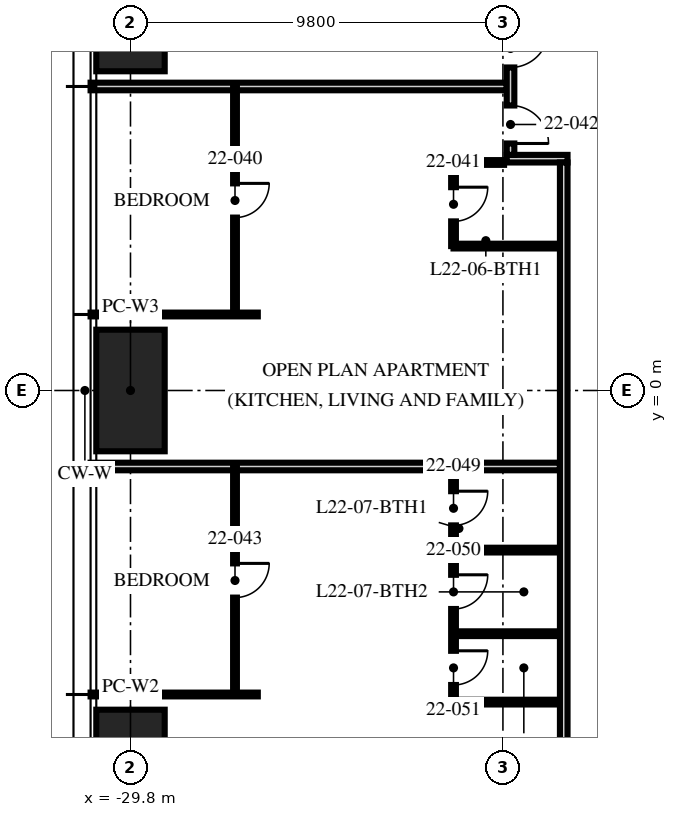
"""IFC4 building model, lengths in metres.
Left out: names, types, materials, properties, quantities, classifications, styles, units other than length and angle.
Written with IfcOpenShell. Run it as: python <this file> out.ifc"""

import sys

from ifc_helpers import new_model, si_unit, direction, frame, frame_2d, origin, origin_2d, place, context, subcontext, project, spatial, rectangle, hollow_rectangle, extrude, element, fill, save


model = new_model("IFC4")
c1 = context("Model", 3, precision=1e-05, world=origin(), true_north=direction((0.0, 1.0)))
c2 = subcontext(c1, "Body", "Model", "MODEL_VIEW")
j1 = project(units=[si_unit("LENGTHUNIT", "METRE"), si_unit("PLANEANGLEUNIT", "RADIAN")], contexts=[c1])
p1 = place(None, origin())
s1 = spatial("IfcSite", under=j1, at=p1, CompositionType="ELEMENT")
p2 = place(p1, origin())
s2 = spatial("IfcBuilding", under=s1, at=p2, CompositionType="ELEMENT")
p3 = place(p2, frame((0.0, 0.0, 88.5)))
s3 = spatial("IfcBuildingStorey", under=s2, at=p3, CompositionType="ELEMENT", Elevation=88.5)
for number, where, z_axis, x_axis in (
    (1, (-29.8, -10.0, 0.0), (0.0, 0.0, 1.0), (0.0, 1.0, 0.0)),
    (2, (-29.8, 0.0, 0.0), (0.0, 0.0, 1.0), (0.0, 1.0, 0.0)),
    (3, (-29.8, 10.0, 0.0), (0.0, 0.0, 1.0), (0.0, 1.0, 0.0)),
):
    element("IfcColumn", number, at=place(p3, frame(where, z_axis=z_axis, x_axis=x_axis)), inside=s3, PredefinedType="COLUMN", context=c2, shape_type="SweptSolid", body=[
        extrude(hollow_rectangle(XDim=3.2, YDim=1.8, WallThickness=0.2, at=origin_2d()), origin(), (0.0, 0.0, 1.0), 3.75),
    ])
p4 = place(p3, frame((-19.9, 8.0, 0.0), z_axis=(0.0, 0.0, 1.0), x_axis=(-1.0, 0.0, 0.0)))
e4 = element("IfcWall", 4, at=p4, inside=s3, PredefinedType="PARTITIONING", context=c2, shape_type="SweptSolid", body=[
    extrude(rectangle(XDim=10.95, YDim=0.2, at=frame_2d((5.475, 0.0))), origin(), (0.0, 0.0, 1.0), 2.71),
])
p5 = place(p3, frame((-26.45, 2.0, 0.0), z_axis=(0.0, 0.0, 1.0), x_axis=(-1.0, 0.0, 0.0)))
e5 = element("IfcWall", 5, at=p5, inside=s3, PredefinedType="PARTITIONING", context=c2, shape_type="SweptSolid", body=[
    extrude(rectangle(XDim=4.4, YDim=0.1, at=frame_2d((2.2, 0.0))), origin(), (0.0, 0.0, 1.0), 2.71),
])
p6 = place(p3, frame((-18.5, -2.0, 0.0), z_axis=(0.0, 0.0, 1.0), x_axis=(-1.0, 0.0, 0.0)))
e6 = element("IfcWall", 6, at=p6, inside=s3, PredefinedType="PARTITIONING", context=c2, shape_type="SweptSolid", body=[
    extrude(rectangle(XDim=12.35, YDim=0.2, at=frame_2d((6.175, 0.0))), origin(), (0.0, 0.0, 1.0), 2.71),
])
p7 = place(p3, frame((-26.45, -8.0, 0.0), z_axis=(0.0, 0.0, 1.0), x_axis=(-1.0, 0.0, 0.0)))
e7 = element("IfcWall", 7, at=p7, inside=s3, PredefinedType="PARTITIONING", context=c2, shape_type="SweptSolid", body=[
    extrude(rectangle(XDim=4.4, YDim=0.1, at=frame_2d((2.2, 0.0))), origin(), (0.0, 0.0, 1.0), 2.71),
])
p8 = place(p3, frame((-27.05, 8.0, 0.0), z_axis=(0.0, 0.0, 1.0), x_axis=(0.0, -1.0, 0.0)))
e8 = element("IfcWall", 8, at=p8, inside=s3, PredefinedType="PARTITIONING", context=c2, shape_type="SweptSolid", body=[
    extrude(rectangle(XDim=6.0, YDim=0.1, at=frame_2d((3.0, 0.0))), origin(), (0.0, 0.0, 1.0), 2.61),
])
p9 = place(p8, frame((2.55, 0.0, 0.0)))
e9 = element("IfcOpeningElement", 9, at=p9, cuts=e8, PredefinedType="OPENING", context=c2, shape_type="SweptSolid", body=[
    extrude(rectangle(XDim=0.9, YDim=2.1, at=frame_2d((0.45, 1.05))), frame((0.0, 0.06, 0.0), z_axis=(0.0, -1.0, 0.0), x_axis=(1.0, 0.0, 0.0)), (0.0, 0.0, 1.0), 0.12),
])
p10 = place(p3, frame((-21.3, 6.0, 0.0), z_axis=(0.0, 0.0, 1.0), x_axis=(0.0, -1.0, 0.0)))
e10 = element("IfcWall", 10, at=p10, inside=s3, PredefinedType="PARTITIONING", context=c2, shape_type="SweptSolid", body=[
    extrude(rectangle(XDim=2.2, YDim=0.125, at=frame_2d((1.1, 0.0))), origin(), (0.0, 0.0, 1.0), 2.61),
])
p11 = place(p10, frame((0.65, 0.0, 0.0)))
e11 = element("IfcOpeningElement", 11, at=p11, cuts=e10, PredefinedType="OPENING", context=c2, shape_type="SweptSolid", body=[
    extrude(rectangle(XDim=0.9, YDim=2.1, at=frame_2d((0.45, 1.05))), frame((0.0, 0.073, 0.0), z_axis=(0.0, -1.0, 0.0), x_axis=(1.0, 0.0, 0.0)), (0.0, 0.0, 1.0), 0.145),
])
p12 = place(p3, frame((-19.97, 6.0, 0.0), z_axis=(0.0, 0.0, 1.0), x_axis=(-1.0, 0.0, 0.0)))
e12 = element("IfcWall", 12, at=p12, inside=s3, PredefinedType="PARTITIONING", context=c2, shape_type="SweptSolid", body=[
    extrude(rectangle(XDim=1.33, YDim=0.125, at=frame_2d((0.665, 0.0))), origin(), (0.0, 0.0, 1.0), 3.5),
])
p13 = place(p3, frame((-18.5, 3.8, 0.0), z_axis=(0.0, 0.0, 1.0), x_axis=(-1.0, 0.0, 0.0)))
e13 = element("IfcWall", 13, at=p13, inside=s3, PredefinedType="PARTITIONING", context=c2, shape_type="SweptSolid", body=[
    extrude(rectangle(XDim=2.8, YDim=0.125, at=frame_2d((1.4, 0.0))), origin(), (0.0, 0.0, 1.0), 3.5),
])
p14 = place(p3, frame((-27.05, -2.0, 0.0), z_axis=(0.0, 0.0, 1.0), x_axis=(0.0, -1.0, 0.0)))
e14 = element("IfcWall", 14, at=p14, inside=s3, PredefinedType="PARTITIONING", context=c2, shape_type="SweptSolid", body=[
    extrude(rectangle(XDim=6.0, YDim=0.1, at=frame_2d((3.0, 0.0))), origin(), (0.0, 0.0, 1.0), 2.61),
])
p15 = place(p14, frame((2.55, 0.0, 0.0)))
e15 = element("IfcOpeningElement", 15, at=p15, cuts=e14, PredefinedType="OPENING", context=c2, shape_type="SweptSolid", body=[
    extrude(rectangle(XDim=0.9, YDim=2.1, at=frame_2d((0.45, 1.05))), frame((0.0, 0.06, 0.0), z_axis=(0.0, -1.0, 0.0), x_axis=(1.0, 0.0, 0.0)), (0.0, 0.0, 1.0), 0.12),
])
p16 = place(p3, frame((-21.3, -2.0, 0.0), z_axis=(0.0, 0.0, 1.0), x_axis=(0.0, -1.0, 0.0)))
e16 = element("IfcWall", 16, at=p16, inside=s3, PredefinedType="PARTITIONING", context=c2, shape_type="SweptSolid", body=[
    extrude(rectangle(XDim=6.2, YDim=0.125, at=frame_2d((3.1, 0.0))), origin(), (0.0, 0.0, 1.0), 2.61),
])
p17 = place(p16, frame((0.65, 0.0, 0.0)))
e17 = element("IfcOpeningElement", 17, at=p17, cuts=e16, PredefinedType="OPENING", context=c2, shape_type="SweptSolid", body=[
    extrude(rectangle(XDim=0.9, YDim=2.1, at=frame_2d((0.45, 1.05))), frame((0.0, 0.073, 0.0), z_axis=(0.0, -1.0, 0.0), x_axis=(1.0, 0.0, 0.0)), (0.0, 0.0, 1.0), 0.145),
])
p18 = place(p16, frame((2.85, 0.0, 0.0)))
e18 = element("IfcOpeningElement", 18, at=p18, cuts=e16, PredefinedType="OPENING", context=c2, shape_type="SweptSolid", body=[
    extrude(rectangle(XDim=0.9, YDim=2.1, at=frame_2d((0.45, 1.05))), frame((0.0, 0.073, 0.0), z_axis=(0.0, -1.0, 0.0), x_axis=(1.0, 0.0, 0.0)), (0.0, 0.0, 1.0), 0.145),
])
p19 = place(p16, frame((4.85, 0.0, 0.0)))
e19 = element("IfcOpeningElement", 19, at=p19, cuts=e16, PredefinedType="OPENING", context=c2, shape_type="SweptSolid", body=[
    extrude(rectangle(XDim=0.9, YDim=2.1, at=frame_2d((0.45, 1.05))), frame((0.0, 0.073, 0.0), z_axis=(0.0, -1.0, 0.0), x_axis=(1.0, 0.0, 0.0)), (0.0, 0.0, 1.0), 0.145),
])
for number, where, z_axis, x_axis in (
    (20, (-18.5, -4.2, 0.0), (0.0, 0.0, 1.0), (-1.0, 0.0, 0.0)),
    (21, (-18.5, -6.4, 0.0), (0.0, 0.0, 1.0), (-1.0, 0.0, 0.0)),
    (22, (-18.5, -8.2, 0.0), (0.0, 0.0, 1.0), (-1.0, 0.0, 0.0)),
):
    element("IfcWall", number, at=place(p3, frame(where, z_axis=z_axis, x_axis=x_axis)), inside=s3, PredefinedType="PARTITIONING", context=c2, shape_type="SweptSolid", body=[
        extrude(rectangle(XDim=2.8, YDim=0.125, at=frame_2d((1.4, 0.0))), origin(), (0.0, 0.0, 1.0), 3.5),
    ])
p20 = place(p3, frame((-18.3, 6.1, 0.0), z_axis=(0.0, 0.0, 1.0), x_axis=(-1.0, 0.0, 0.0)))
e23 = element("IfcWall", 23, at=p20, inside=s3, PredefinedType="PARTITIONING", context=c2, shape_type="SweptSolid", body=[
    extrude(rectangle(XDim=1.6, YDim=0.2, at=frame_2d((0.8, 0.0))), origin(), (0.0, 0.0, 1.0), 3.5),
])
p21 = place(p3, frame((-19.8, 9.8, 0.0), z_axis=(0.0, 0.0, 1.0), x_axis=(0.0, -1.0, 0.0)))
e24 = element("IfcWall", 24, at=p21, inside=s3, PredefinedType="PARTITIONING", context=c2, shape_type="SweptSolid", body=[
    extrude(rectangle(XDim=3.6, YDim=0.2, at=frame_2d((1.8, 0.0))), origin(), (0.0, 0.0, 1.0), 3.5),
])
p22 = place(p21, frame((0.3, 0.0, 0.0)))
e25 = element("IfcOpeningElement", 25, at=p22, cuts=e24, PredefinedType="OPENING", context=c2, shape_type="SweptSolid", body=[
    extrude(rectangle(XDim=1.0, YDim=2.2, at=frame_2d((0.5, 1.1))), frame((0.0, 0.11, 0.0), z_axis=(0.0, -1.0, 0.0), x_axis=(1.0, 0.0, 0.0)), (0.0, 0.0, 1.0), 0.22),
])
p23 = place(p21, frame((2.3, 0.0, 0.0)))
e26 = element("IfcOpeningElement", 26, at=p23, cuts=e24, PredefinedType="OPENING", context=c2, shape_type="SweptSolid", body=[
    extrude(rectangle(XDim=1.0, YDim=2.2, at=frame_2d((0.5, 1.1))), frame((0.0, 0.11, 0.0), z_axis=(0.0, -1.0, 0.0), x_axis=(1.0, 0.0, 0.0)), (0.0, 0.0, 1.0), 0.22),
])
p24 = place(p3, frame((-18.4, 6.0, 0.0), z_axis=(0.0, 0.0, 1.0), x_axis=(0.0, -1.0, 0.0)))
e27 = element("IfcWall", 27, at=p24, inside=s3, PredefinedType="PARTITIONING", context=c2, shape_type="SweptSolid", body=[
    extrude(rectangle(XDim=24.3, YDim=0.2, at=frame_2d((12.15, 0.0))), origin(), (0.0, 0.0, 1.0), 2.3),
])
p25 = place(p22, origin())
e28 = element("IfcDoor", 28, at=p25, inside=s3, OperationType="SINGLE_SWING_LEFT", PredefinedType="DOOR", context=c2, shape_type="SweptSolid", body=[
    extrude(rectangle(XDim=1.0, YDim=2.2, at=frame_2d((0.5, 1.1))), frame((0.0, 0.025, 0.0), z_axis=(0.0, -1.0, 0.0), x_axis=(1.0, 0.0, 0.0)), (0.0, 0.0, 1.0), 0.05),
])
fill(e25, e28)
p26 = place(p9, origin())
e29 = element("IfcDoor", 29, at=p26, inside=s3, OperationType="SINGLE_SWING_LEFT", PredefinedType="DOOR", context=c2, shape_type="SweptSolid", body=[
    extrude(rectangle(XDim=0.9, YDim=2.1, at=frame_2d((0.45, 1.05))), frame((0.0, 0.025, 0.0), z_axis=(0.0, -1.0, 0.0), x_axis=(1.0, 0.0, 0.0)), (0.0, 0.0, 1.0), 0.05),
])
fill(e9, e29)
p27 = place(p11, origin())
e30 = element("IfcDoor", 30, at=p27, inside=s3, OperationType="SINGLE_SWING_LEFT", PredefinedType="DOOR", context=c2, shape_type="SweptSolid", body=[
    extrude(rectangle(XDim=0.9, YDim=2.1, at=frame_2d((0.45, 1.05))), frame((0.0, 0.025, 0.0), z_axis=(0.0, -1.0, 0.0), x_axis=(1.0, 0.0, 0.0)), (0.0, 0.0, 1.0), 0.05),
])
fill(e11, e30)
p28 = place(p23, origin())
e31 = element("IfcDoor", 31, at=p28, inside=s3, OperationType="SINGLE_SWING_RIGHT", PredefinedType="DOOR", context=c2, shape_type="SweptSolid", body=[
    extrude(rectangle(XDim=1.0, YDim=2.2, at=frame_2d((0.5, 1.1))), frame((0.0, 0.025, 0.0), z_axis=(0.0, -1.0, 0.0), x_axis=(1.0, 0.0, 0.0)), (0.0, 0.0, 1.0), 0.05),
])
fill(e26, e31)
p29 = place(p15, origin())
e32 = element("IfcDoor", 32, at=p29, inside=s3, OperationType="SINGLE_SWING_LEFT", PredefinedType="DOOR", context=c2, shape_type="SweptSolid", body=[
    extrude(rectangle(XDim=0.9, YDim=2.1, at=frame_2d((0.45, 1.05))), frame((0.0, 0.025, 0.0), z_axis=(0.0, -1.0, 0.0), x_axis=(1.0, 0.0, 0.0)), (0.0, 0.0, 1.0), 0.05),
])
fill(e15, e32)
p30 = place(p17, origin())
e33 = element("IfcDoor", 33, at=p30, inside=s3, OperationType="SINGLE_SWING_LEFT", PredefinedType="DOOR", context=c2, shape_type="SweptSolid", body=[
    extrude(rectangle(XDim=0.9, YDim=2.1, at=frame_2d((0.45, 1.05))), frame((0.0, 0.025, 0.0), z_axis=(0.0, -1.0, 0.0), x_axis=(1.0, 0.0, 0.0)), (0.0, 0.0, 1.0), 0.05),
])
fill(e17, e33)
p31 = place(p18, origin())
e34 = element("IfcDoor", 34, at=p31, inside=s3, OperationType="SINGLE_SWING_LEFT", PredefinedType="DOOR", context=c2, shape_type="SweptSolid", body=[
    extrude(rectangle(XDim=0.9, YDim=2.1, at=frame_2d((0.45, 1.05))), frame((0.0, 0.025, 0.0), z_axis=(0.0, -1.0, 0.0), x_axis=(1.0, 0.0, 0.0)), (0.0, 0.0, 1.0), 0.05),
])
fill(e18, e34)
p32 = place(p19, origin())
e35 = element("IfcDoor", 35, at=p32, inside=s3, OperationType="SINGLE_SWING_LEFT", PredefinedType="DOOR", context=c2, shape_type="SweptSolid", body=[
    extrude(rectangle(XDim=0.9, YDim=2.1, at=frame_2d((0.45, 1.05))), frame((0.0, 0.025, 0.0), z_axis=(0.0, -1.0, 0.0), x_axis=(1.0, 0.0, 0.0)), (0.0, 0.0, 1.0), 0.05),
])
fill(e19, e35)
save(model, sys.argv[1])
